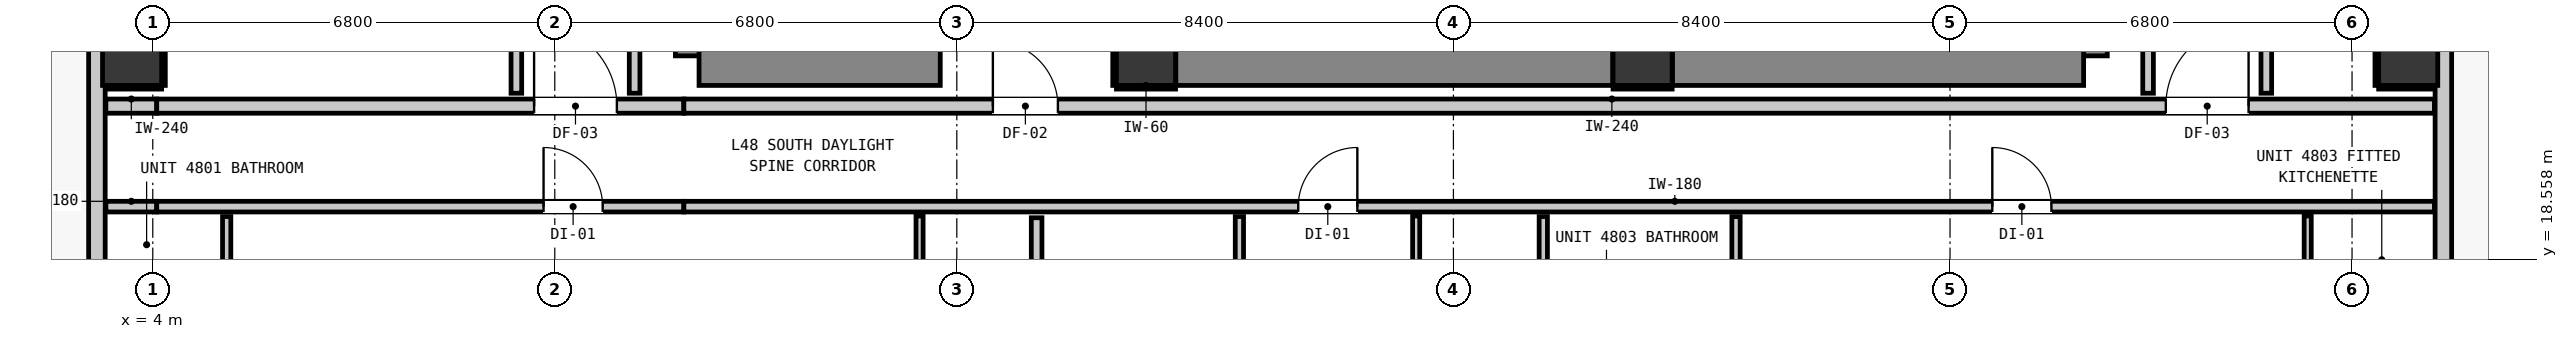
"""IFC4 building model, lengths in metres.
Left out: names, types, materials, properties, quantities, classifications, styles, units other than length and angle.
Written with IfcOpenShell. Run it as: python <this file> out.ifc"""

import sys

from ifc_helpers import new_model, si_unit, direction, frame, frame_2d, origin, origin_2d, place, context, subcontext, project, spatial, rectangle, extrude, element, fill, save


model = new_model("IFC4")
c1 = context("Model", 3, precision=1e-05, world=origin(), true_north=direction((0.0, 1.0)))
c2 = subcontext(c1, "Body", "Model", "MODEL_VIEW")
j1 = project(units=[si_unit("LENGTHUNIT", "METRE"), si_unit("PLANEANGLEUNIT", "RADIAN")], contexts=[c1])
p1 = place(None, origin())
s1 = spatial("IfcSite", under=j1, at=p1, CompositionType="ELEMENT")
p2 = place(p1, origin())
s2 = spatial("IfcBuilding", under=s1, at=p2, CompositionType="ELEMENT")
p3 = place(p2, frame((0.0, 0.0, 165.84)))
s3 = spatial("IfcBuildingStorey", under=s2, at=p3, CompositionType="ELEMENT", Elevation=165.84)
for number, where, z_axis, x_axis in (
    (1, (20.8, 22.0, 0.0), (0.0, 0.0, 1.0), (1.0, 0.0, 0.0)),
    (2, (29.2, 22.0, 0.0), (0.0, 0.0, 1.0), (1.0, 0.0, 0.0)),
):
    element("IfcColumn", number, at=place(p3, frame(where, z_axis=z_axis, x_axis=x_axis)), inside=s3, PredefinedType="COLUMN", context=c2, shape_type="SweptSolid", body=[
        extrude(rectangle(XDim=1.0, YDim=1.0, at=origin_2d()), origin(), (0.0, 0.0, 1.0), 3.32),
    ])
p4 = place(p3, frame((13.34, 22.0, 0.0), z_axis=(0.0, 0.0, 1.0), x_axis=(0.0, 1.0, 0.0)))
e3 = element("IfcWall", 3, at=p4, inside=s3, PredefinedType="SHEAR", context=c2, shape_type="SweptSolid", body=[
    extrude(rectangle(XDim=8.195, YDim=1.0, at=frame_2d((4.098, 0.0))), origin(), (0.0, 0.0, 1.0), 3.32),
])
p5 = place(p3, frame((13.24, 22.0, 0.0), z_axis=(0.0, 0.0, 1.0), x_axis=(1.0, 0.0, 0.0)))
e4 = element("IfcWall", 4, at=p5, inside=s3, PredefinedType="SHEAR", context=c2, shape_type="SweptSolid", body=[
    extrude(rectangle(XDim=4.08, YDim=1.0, at=frame_2d((2.04, 0.0))), origin(), (0.0, 0.0, 1.0), 3.32),
])
p6 = place(p3, frame((36.56, 22.0, 0.0), z_axis=(0.0, 0.0, 1.0), x_axis=(0.0, 1.0, 0.0)))
e5 = element("IfcWall", 5, at=p6, inside=s3, PredefinedType="SHEAR", context=c2, shape_type="SweptSolid", body=[
    extrude(rectangle(XDim=8.195, YDim=1.0, at=frame_2d((4.098, 0.0))), origin(), (0.0, 0.0, 1.0), 3.32),
])
p7 = place(p3, frame((29.705, 22.0, 0.0), z_axis=(0.0, 0.0, 1.0), x_axis=(1.0, 0.0, 0.0)))
e6 = element("IfcWall", 6, at=p7, inside=s3, PredefinedType="SHEAR", context=c2, shape_type="SweptSolid", body=[
    extrude(rectangle(XDim=6.955, YDim=1.0, at=frame_2d((3.478, 0.0))), origin(), (0.0, 0.0, 1.0), 3.32),
])
p8 = place(p3, frame((21.305, 22.0, 0.0), z_axis=(0.0, 0.0, 1.0), x_axis=(1.0, 0.0, 0.0)))
e7 = element("IfcWall", 7, at=p8, inside=s3, PredefinedType="SHEAR", context=c2, shape_type="SweptSolid", body=[
    extrude(rectangle(XDim=7.39, YDim=1.0, at=frame_2d((3.695, 0.0))), origin(), (0.0, 0.0, 1.0), 3.32),
])
for number, where, z_axis, x_axis in (
    (8, (3.65, 22.0, -0.2), (0.0, 0.0, 1.0), (1.0, 0.0, 0.0)),
    (9, (42.15, 22.0, -0.2), (0.0, 0.0, 1.0), (1.0, 0.0, 0.0)),
):
    element("IfcColumn", number, at=place(p3, frame(where, z_axis=z_axis, x_axis=x_axis)), inside=s3, PredefinedType="COLUMN", context=c2, shape_type="SweptSolid", body=[
        extrude(rectangle(XDim=1.0, YDim=1.0, at=origin_2d()), origin(), (0.0, 0.0, 1.0), 3.52),
    ])
p9 = place(p3, frame((3.055, 17.555, 0.0), z_axis=(0.0, 0.0, 1.0), x_axis=(0.0, 1.0, 0.0)))
e10 = element("IfcWall", 10, at=p9, inside=s3, PredefinedType="STANDARD", context=c2, shape_type="SweptSolid", body=[
    extrude(rectangle(XDim=32.29, YDim=0.28, at=frame_2d((16.145, 0.0))), origin(), (0.0, 0.0, 1.0), 3.08),
])
p10 = place(p9, frame((6.871, 0.0, 0.0)))
e11 = element("IfcOpeningElement", 11, at=p10, cuts=e10, PredefinedType="OPENING", context=c2, shape_type="SweptSolid", body=[
    extrude(rectangle(XDim=1.0, YDim=2.15, at=frame_2d((0.5, 1.075))), frame((0.0, 0.15, 0.0), z_axis=(0.0, -1.0, 0.0), x_axis=(1.0, 0.0, 0.0)), (0.0, 0.0, 1.0), 0.3),
])
p11 = place(p9, frame((30.527, 0.0, 0.85)))
e12 = element("IfcOpeningElement", 12, at=p11, cuts=e10, PredefinedType="OPENING", context=c2, shape_type="SweptSolid", body=[
    extrude(rectangle(XDim=1.5, YDim=1.8, at=frame_2d((0.75, 0.9))), frame((0.0, 0.15, 0.0), z_axis=(0.0, -1.0, 0.0), x_axis=(1.0, 0.0, 0.0)), (0.0, 0.0, 1.0), 0.3),
])
p12 = place(p9, frame((8.375, 0.0, 0.85)))
e13 = element("IfcOpeningElement", 13, at=p12, cuts=e10, PredefinedType="OPENING", context=c2, shape_type="SweptSolid", body=[
    extrude(rectangle(XDim=1.5, YDim=1.8, at=frame_2d((0.75, 0.9))), frame((0.0, 0.15, 0.0), z_axis=(0.0, -1.0, 0.0), x_axis=(1.0, 0.0, 0.0)), (0.0, 0.0, 1.0), 0.3),
])
p13 = place(p9, frame((10.762, 0.0, 0.85)))
e14 = element("IfcOpeningElement", 14, at=p13, cuts=e10, PredefinedType="OPENING", context=c2, shape_type="SweptSolid", body=[
    extrude(rectangle(XDim=1.5, YDim=1.8, at=frame_2d((0.75, 0.9))), frame((0.0, 0.15, 0.0), z_axis=(0.0, -1.0, 0.0), x_axis=(1.0, 0.0, 0.0)), (0.0, 0.0, 1.0), 0.3),
])
p14 = place(p9, frame((17.075, 0.0, 0.85)))
e15 = element("IfcOpeningElement", 15, at=p14, cuts=e10, PredefinedType="OPENING", context=c2, shape_type="SweptSolid", body=[
    extrude(rectangle(XDim=1.5, YDim=1.8, at=frame_2d((0.75, 0.9))), frame((0.0, 0.15, 0.0), z_axis=(0.0, -1.0, 0.0), x_axis=(1.0, 0.0, 0.0)), (0.0, 0.0, 1.0), 0.3),
])
p15 = place(p9, frame((20.113, 0.0, 0.85)))
e16 = element("IfcOpeningElement", 16, at=p15, cuts=e10, PredefinedType="OPENING", context=c2, shape_type="SweptSolid", body=[
    extrude(rectangle(XDim=1.05, YDim=1.65, at=frame_2d((0.525, 0.825))), frame((0.0, 0.15, 0.0), z_axis=(0.0, -1.0, 0.0), x_axis=(1.0, 0.0, 0.0)), (0.0, 0.0, 1.0), 0.3),
])
p16 = place(p3, frame((42.745, 49.845, 0.0), z_axis=(0.0, 0.0, 1.0), x_axis=(0.0, -1.0, 0.0)))
e17 = element("IfcWall", 17, at=p16, inside=s3, PredefinedType="STANDARD", context=c2, shape_type="SweptSolid", body=[
    extrude(rectangle(XDim=32.29, YDim=0.28, at=frame_2d((16.145, 0.0))), origin(), (0.0, 0.0, 1.0), 3.08),
])
p17 = place(p16, frame((0.503, 0.0, 0.0)))
e18 = element("IfcOpeningElement", 18, at=p17, cuts=e17, PredefinedType="OPENING", context=c2, shape_type="SweptSolid", body=[
    extrude(rectangle(XDim=1.1, YDim=2.15, at=frame_2d((0.55, 1.075))), frame((0.0, 0.15, 0.0), z_axis=(0.0, -1.0, 0.0), x_axis=(1.0, 0.0, 0.0)), (0.0, 0.0, 1.0), 0.3),
])
p18 = place(p16, frame((2.699, 0.0, 0.85)))
e19 = element("IfcOpeningElement", 19, at=p18, cuts=e17, PredefinedType="OPENING", context=c2, shape_type="SweptSolid", body=[
    extrude(rectangle(XDim=1.5, YDim=1.8, at=frame_2d((0.75, 0.9))), frame((0.0, 0.15, 0.0), z_axis=(0.0, -1.0, 0.0), x_axis=(1.0, 0.0, 0.0)), (0.0, 0.0, 1.0), 0.3),
])
p19 = place(p16, frame((23.17, 0.0, 0.85)))
e20 = element("IfcOpeningElement", 20, at=p19, cuts=e17, PredefinedType="OPENING", context=c2, shape_type="SweptSolid", body=[
    extrude(rectangle(XDim=1.5, YDim=1.8, at=frame_2d((0.75, 0.9))), frame((0.0, 0.15, 0.0), z_axis=(0.0, -1.0, 0.0), x_axis=(1.0, 0.0, 0.0)), (0.0, 0.0, 1.0), 0.3),
])
p20 = place(p16, frame((13.62, 0.0, 0.85)))
e21 = element("IfcOpeningElement", 21, at=p20, cuts=e17, PredefinedType="OPENING", context=c2, shape_type="SweptSolid", body=[
    extrude(rectangle(XDim=1.5, YDim=1.8, at=frame_2d((0.75, 0.9))), frame((0.0, 0.15, 0.0), z_axis=(0.0, -1.0, 0.0), x_axis=(1.0, 0.0, 0.0)), (0.0, 0.0, 1.0), 0.3),
])
p21 = place(p3, frame((3.207, 21.15, 0.0), z_axis=(0.0, 0.0, 1.0), x_axis=(1.0, 0.0, 0.0)))
e22 = element("IfcWall", 22, at=p21, inside=s3, PredefinedType="PARTITIONING", context=c2, shape_type="SweptSolid", body=[
    extrude(rectangle(XDim=0.86, YDim=0.24, at=frame_2d((0.43, 0.0))), origin(), (0.0, 0.0, 1.0), 3.08),
])
p22 = place(p3, frame((4.067, 21.15, 0.0), z_axis=(0.0, 0.0, 1.0), x_axis=(1.0, 0.0, 0.0)))
e23 = element("IfcWall", 23, at=p22, inside=s3, PredefinedType="PARTITIONING", context=c2, shape_type="SweptSolid", body=[
    extrude(rectangle(XDim=8.916, YDim=0.24, at=frame_2d((4.458, 0.0))), origin(), (0.0, 0.0, 1.0), 2.565),
])
p23 = place(p22, frame((6.383, 0.0, 0.0)))
e24 = element("IfcOpeningElement", 24, at=p23, cuts=e23, PredefinedType="OPENING", context=c2, shape_type="SweptSolid", body=[
    extrude(rectangle(XDim=1.4, YDim=2.15, at=frame_2d((0.7, 1.075))), frame((0.0, 0.13, 0.0), z_axis=(0.0, -1.0, 0.0), x_axis=(1.0, 0.0, 0.0)), (0.0, 0.0, 1.0), 0.26),
])
p24 = place(p3, frame((12.983, 21.15, 0.0), z_axis=(0.0, 0.0, 1.0), x_axis=(1.0, 0.0, 0.0)))
e25 = element("IfcWall", 25, at=p24, inside=s3, PredefinedType="PARTITIONING", context=c2, shape_type="SweptSolid", body=[
    extrude(rectangle(XDim=29.61, YDim=0.24, at=frame_2d((14.805, 0.0))), origin(), (0.0, 0.0, 1.0), 3.08),
])
p25 = place(p24, frame((5.227, 0.0, 0.0)))
e26 = element("IfcOpeningElement", 26, at=p25, cuts=e25, PredefinedType="OPENING", context=c2, shape_type="SweptSolid", body=[
    extrude(rectangle(XDim=1.1, YDim=2.15, at=frame_2d((0.55, 1.075))), frame((0.0, 0.13, 0.0), z_axis=(0.0, -1.0, 0.0), x_axis=(1.0, 0.0, 0.0)), (0.0, 0.0, 1.0), 0.26),
])
p26 = place(p24, frame((25.067, 0.0, 0.0)))
e27 = element("IfcOpeningElement", 27, at=p26, cuts=e25, PredefinedType="OPENING", context=c2, shape_type="SweptSolid", body=[
    extrude(rectangle(XDim=1.4, YDim=2.15, at=frame_2d((0.7, 1.075))), frame((0.0, 0.13, 0.0), z_axis=(0.0, -1.0, 0.0), x_axis=(1.0, 0.0, 0.0)), (0.0, 0.0, 1.0), 0.26),
])
p27 = place(p3, frame((3.207, 19.45, 0.0), z_axis=(0.0, 0.0, 1.0), x_axis=(1.0, 0.0, 0.0)))
e28 = element("IfcWall", 28, at=p27, inside=s3, PredefinedType="PARTITIONING", context=c2, shape_type="SweptSolid", body=[
    extrude(rectangle(XDim=0.86, YDim=0.18, at=frame_2d((0.43, 0.0))), origin(), (0.0, 0.0, 1.0), 3.08),
])
p28 = place(p3, frame((4.067, 19.45, 0.0), z_axis=(0.0, 0.0, 1.0), x_axis=(1.0, 0.0, 0.0)))
e29 = element("IfcWall", 29, at=p28, inside=s3, PredefinedType="PARTITIONING", context=c2, shape_type="SweptSolid", body=[
    extrude(rectangle(XDim=8.916, YDim=0.18, at=frame_2d((4.458, 0.0))), origin(), (0.0, 0.0, 1.0), 2.565),
])
p29 = place(p28, frame((6.543, 0.0, 0.0)))
e30 = element("IfcOpeningElement", 30, at=p29, cuts=e29, PredefinedType="OPENING", context=c2, shape_type="SweptSolid", body=[
    extrude(rectangle(XDim=1.0, YDim=2.15, at=frame_2d((0.5, 1.075))), frame((0.0, 0.1, 0.0), z_axis=(0.0, -1.0, 0.0), x_axis=(1.0, 0.0, 0.0)), (0.0, 0.0, 1.0), 0.2),
])
p30 = place(p3, frame((12.983, 19.45, 0.0), z_axis=(0.0, 0.0, 1.0), x_axis=(1.0, 0.0, 0.0)))
e31 = element("IfcWall", 31, at=p30, inside=s3, PredefinedType="PARTITIONING", context=c2, shape_type="SweptSolid", body=[
    extrude(rectangle(XDim=29.61, YDim=0.18, at=frame_2d((14.805, 0.0))), origin(), (0.0, 0.0, 1.0), 3.08),
])
p31 = place(p30, frame((10.392, 0.0, 0.0)))
e32 = element("IfcOpeningElement", 32, at=p31, cuts=e31, PredefinedType="OPENING", context=c2, shape_type="SweptSolid", body=[
    extrude(rectangle(XDim=1.0, YDim=2.15, at=frame_2d((0.5, 1.075))), frame((0.0, 0.1, 0.0), z_axis=(0.0, -1.0, 0.0), x_axis=(1.0, 0.0, 0.0)), (0.0, 0.0, 1.0), 0.2),
])
p32 = place(p30, frame((22.132, 0.0, 0.0)))
e33 = element("IfcOpeningElement", 33, at=p32, cuts=e31, PredefinedType="OPENING", context=c2, shape_type="SweptSolid", body=[
    extrude(rectangle(XDim=1.0, YDim=2.15, at=frame_2d((0.5, 1.075))), frame((0.0, 0.1, 0.0), z_axis=(0.0, -1.0, 0.0), x_axis=(1.0, 0.0, 0.0)), (0.0, 0.0, 1.0), 0.2),
])
p33 = place(p3, frame((10.15, 21.368, 0.0), z_axis=(0.0, 0.0, 1.0), x_axis=(0.0, 1.0, 0.0)))
e34 = element("IfcWall", 34, at=p33, inside=s3, PredefinedType="PARTITIONING", context=c2, shape_type="SweptSolid", body=[
    extrude(rectangle(XDim=2.298, YDim=0.18, at=frame_2d((1.149, 0.0))), origin(), (0.0, 0.0, 1.0), 3.08),
])
p34 = place(p3, frame((12.15, 21.368, 0.0), z_axis=(0.0, 0.0, 1.0), x_axis=(0.0, 1.0, 0.0)))
e35 = element("IfcWall", 35, at=p34, inside=s3, PredefinedType="PARTITIONING", context=c2, shape_type="SweptSolid", body=[
    extrude(rectangle(XDim=18.694, YDim=0.18, at=frame_2d((9.347, 0.0))), origin(), (0.0, 0.0, 1.0), 3.08),
])
p35 = place(p3, frame((18.95, 15.407, 0.0), z_axis=(0.0, 0.0, 1.0), x_axis=(0.0, 1.0, 0.0)))
e36 = element("IfcWall", 36, at=p35, inside=s3, PredefinedType="PARTITIONING", context=c2, shape_type="SweptSolid", body=[
    extrude(rectangle(XDim=3.855, YDim=0.18, at=frame_2d((1.927, 0.0))), origin(), (0.0, 0.0, 1.0), 3.08),
])
p36 = place(p3, frame((37.75, 21.368, 0.0), z_axis=(0.0, 0.0, 1.0), x_axis=(0.0, 1.0, 0.0)))
e37 = element("IfcWall", 37, at=p36, inside=s3, PredefinedType="PARTITIONING", context=c2, shape_type="SweptSolid", body=[
    extrude(rectangle(XDim=18.694, YDim=0.18, at=frame_2d((9.347, 0.0))), origin(), (0.0, 0.0, 1.0), 3.08),
])
p37 = place(p3, frame((39.75, 21.368, 0.0), z_axis=(0.0, 0.0, 1.0), x_axis=(0.0, 1.0, 0.0)))
e38 = element("IfcWall", 38, at=p37, inside=s3, PredefinedType="PARTITIONING", context=c2, shape_type="SweptSolid", body=[
    extrude(rectangle(XDim=2.576, YDim=0.18, at=frame_2d((1.288, 0.0))), origin(), (0.0, 0.0, 1.0), 3.08),
])
p38 = place(p3, frame((5.25, 15.575, 0.0), z_axis=(0.0, 0.0, 1.0), x_axis=(0.0, 1.0, 0.0)))
e39 = element("IfcWall", 39, at=p38, inside=s3, PredefinedType="PARTITIONING", context=c2, shape_type="SweptSolid", body=[
    extrude(rectangle(XDim=3.707, YDim=0.14, at=frame_2d((1.854, 0.0))), origin(), (0.0, 0.0, 1.0), 3.08),
])
p39 = place(p38, frame((1.42, 0.0, 0.0)))
e40 = element("IfcOpeningElement", 40, at=p39, cuts=e39, PredefinedType="OPENING", context=c2, shape_type="SweptSolid", body=[
    extrude(rectangle(XDim=0.86, YDim=2.02, at=frame_2d((0.43, 1.01))), frame((0.0, 0.08, 0.0), z_axis=(0.0, -1.0, 0.0), x_axis=(1.0, 0.0, 0.0)), (0.0, 0.0, 1.0), 0.16),
])
p40 = place(p3, frame((22.38, 15.407, 0.0), z_axis=(0.0, 0.0, 1.0), x_axis=(0.0, 1.0, 0.0)))
e41 = element("IfcWall", 41, at=p40, inside=s3, PredefinedType="PARTITIONING", context=c2, shape_type="SweptSolid", body=[
    extrude(rectangle(XDim=3.875, YDim=0.14, at=frame_2d((1.938, 0.0))), origin(), (0.0, 0.0, 1.0), 3.08),
])
p41 = place(p40, frame((1.588, 0.0, 0.0)))
e42 = element("IfcOpeningElement", 42, at=p41, cuts=e41, PredefinedType="OPENING", context=c2, shape_type="SweptSolid", body=[
    extrude(rectangle(XDim=0.86, YDim=2.02, at=frame_2d((0.43, 1.01))), frame((0.0, 0.08, 0.0), z_axis=(0.0, -1.0, 0.0), x_axis=(1.0, 0.0, 0.0)), (0.0, 0.0, 1.0), 0.16),
])
p42 = place(p3, frame((27.52, 15.407, 0.0), z_axis=(0.0, 0.0, 1.0), x_axis=(0.0, 1.0, 0.0)))
e43 = element("IfcWall", 43, at=p42, inside=s3, PredefinedType="PARTITIONING", context=c2, shape_type="SweptSolid", body=[
    extrude(rectangle(XDim=3.875, YDim=0.14, at=frame_2d((1.938, 0.0))), origin(), (0.0, 0.0, 1.0), 3.08),
])
p43 = place(p3, frame((30.78, 15.407, 0.0), z_axis=(0.0, 0.0, 1.0), x_axis=(0.0, 1.0, 0.0)))
e44 = element("IfcWall", 44, at=p43, inside=s3, PredefinedType="PARTITIONING", context=c2, shape_type="SweptSolid", body=[
    extrude(rectangle(XDim=3.875, YDim=0.14, at=frame_2d((1.938, 0.0))), origin(), (0.0, 0.0, 1.0), 3.08),
])
p44 = place(p43, frame((1.588, 0.0, 0.0)))
e45 = element("IfcOpeningElement", 45, at=p44, cuts=e44, PredefinedType="OPENING", context=c2, shape_type="SweptSolid", body=[
    extrude(rectangle(XDim=0.86, YDim=2.02, at=frame_2d((0.43, 1.01))), frame((0.0, 0.08, 0.0), z_axis=(0.0, -1.0, 0.0), x_axis=(1.0, 0.0, 0.0)), (0.0, 0.0, 1.0), 0.16),
])
p45 = place(p3, frame((16.97, 15.407, 0.0), z_axis=(0.0, 0.0, 1.0), x_axis=(0.0, 1.0, 0.0)))
e46 = element("IfcWall", 46, at=p45, inside=s3, PredefinedType="PARTITIONING", context=c2, shape_type="SweptSolid", body=[
    extrude(rectangle(XDim=3.885, YDim=0.12, at=frame_2d((1.942, 0.0))), origin(), (0.0, 0.0, 1.0), 3.08),
])
p46 = place(p45, frame((1.568, 0.0, 0.0)))
e47 = element("IfcOpeningElement", 47, at=p46, cuts=e46, PredefinedType="OPENING", context=c2, shape_type="SweptSolid", body=[
    extrude(rectangle(XDim=0.9, YDim=2.1, at=frame_2d((0.45, 1.05))), frame((0.0, 0.07, 0.0), z_axis=(0.0, -1.0, 0.0), x_axis=(1.0, 0.0, 0.0)), (0.0, 0.0, 1.0), 0.14),
])
p47 = place(p3, frame((25.37, 15.407, 0.0), z_axis=(0.0, 0.0, 1.0), x_axis=(0.0, 1.0, 0.0)))
e48 = element("IfcWall", 48, at=p47, inside=s3, PredefinedType="PARTITIONING", context=c2, shape_type="SweptSolid", body=[
    extrude(rectangle(XDim=3.885, YDim=0.12, at=frame_2d((1.942, 0.0))), origin(), (0.0, 0.0, 1.0), 3.08),
])
p48 = place(p47, frame((1.568, 0.0, 0.0)))
e49 = element("IfcOpeningElement", 49, at=p48, cuts=e48, PredefinedType="OPENING", context=c2, shape_type="SweptSolid", body=[
    extrude(rectangle(XDim=0.9, YDim=2.1, at=frame_2d((0.45, 1.05))), frame((0.0, 0.07, 0.0), z_axis=(0.0, -1.0, 0.0), x_axis=(1.0, 0.0, 0.0)), (0.0, 0.0, 1.0), 0.14),
])
p49 = place(p3, frame((40.45, 15.475, 0.0), z_axis=(0.0, 0.0, 1.0), x_axis=(0.0, 1.0, 0.0)))
e50 = element("IfcWall", 50, at=p49, inside=s3, PredefinedType="PARTITIONING", context=c2, shape_type="SweptSolid", body=[
    extrude(rectangle(XDim=3.817, YDim=0.12, at=frame_2d((1.908, 0.0))), origin(), (0.0, 0.0, 1.0), 3.08),
])
p50 = place(p49, frame((1.5, 0.0, 0.0)))
e51 = element("IfcOpeningElement", 51, at=p50, cuts=e50, PredefinedType="OPENING", context=c2, shape_type="SweptSolid", body=[
    extrude(rectangle(XDim=0.9, YDim=2.1, at=frame_2d((0.45, 1.05))), frame((0.0, 0.07, 0.0), z_axis=(0.0, -1.0, 0.0), x_axis=(1.0, 0.0, 0.0)), (0.0, 0.0, 1.0), 0.14),
])
for number, where, z_axis, x_axis in (
    (52, (20.3, 21.468, 0.0), (0.0, 0.0, 1.0), (1.0, 0.0, 0.0)),
    (53, (20.268, 21.5, 0.0), (0.0, 0.0, 1.0), (0.0, 1.0, 0.0)),
    (54, (28.7, 21.468, 0.0), (0.0, 0.0, 1.0), (1.0, 0.0, 0.0)),
):
    element("IfcWall", number, at=place(p3, frame(where, z_axis=z_axis, x_axis=x_axis)), inside=s3, PredefinedType="PARTITIONING", context=c2, shape_type="SweptSolid", body=[
        extrude(rectangle(XDim=1.0, YDim=0.06, at=frame_2d((0.5, 0.0))), origin(), (0.0, 0.0, 1.0), 1.45),
    ])
p51 = place(p3, frame((3.21, 21.468, 0.0), z_axis=(0.0, 0.0, 1.0), x_axis=(1.0, 0.0, 0.0)))
e55 = element("IfcWall", 55, at=p51, inside=s3, PredefinedType="PARTITIONING", context=c2, shape_type="SweptSolid", body=[
    extrude(rectangle(XDim=0.94, YDim=0.06, at=frame_2d((0.47, 0.0))), origin(), (0.0, 0.0, 1.0), 1.45),
])
p52 = place(p3, frame((4.182, 21.5, 0.0), z_axis=(0.0, 0.0, 1.0), x_axis=(0.0, 1.0, 0.0)))
e56 = element("IfcWall", 56, at=p52, inside=s3, PredefinedType="PARTITIONING", context=c2, shape_type="SweptSolid", body=[
    extrude(rectangle(XDim=1.0, YDim=0.06, at=frame_2d((0.5, 0.0))), origin(), (0.0, 0.0, 1.0), 1.45),
])
p53 = place(p3, frame((41.65, 21.468, 0.0), z_axis=(0.0, 0.0, 1.0), x_axis=(1.0, 0.0, 0.0)))
e57 = element("IfcWall", 57, at=p53, inside=s3, PredefinedType="PARTITIONING", context=c2, shape_type="SweptSolid", body=[
    extrude(rectangle(XDim=0.94, YDim=0.06, at=frame_2d((0.47, 0.0))), origin(), (0.0, 0.0, 1.0), 1.45),
])
p54 = place(p3, frame((41.618, 21.5, 0.0), z_axis=(0.0, 0.0, 1.0), x_axis=(0.0, 1.0, 0.0)))
e58 = element("IfcWall", 58, at=p54, inside=s3, PredefinedType="PARTITIONING", context=c2, shape_type="SweptSolid", body=[
    extrude(rectangle(XDim=1.0, YDim=0.06, at=frame_2d((0.5, 0.0))), origin(), (0.0, 0.0, 1.0), 1.45),
])
p55 = place(p25, origin())
e59 = element("IfcDoor", 59, at=p55, inside=s3, OperationType="SINGLE_SWING_LEFT", PredefinedType="DOOR", context=c2, shape_type="SweptSolid", body=[
    extrude(rectangle(XDim=1.1, YDim=2.15, at=frame_2d((0.55, 1.075))), frame((0.0, 0.025, 0.0), z_axis=(0.0, -1.0, 0.0), x_axis=(1.0, 0.0, 0.0)), (0.0, 0.0, 1.0), 0.05),
])
fill(e26, e59)
p56 = place(p23, origin())
e60 = element("IfcDoor", 60, at=p56, inside=s3, OperationType="SINGLE_SWING_LEFT", PredefinedType="DOOR", context=c2, shape_type="SweptSolid", body=[
    extrude(rectangle(XDim=1.4, YDim=2.15, at=frame_2d((0.7, 1.075))), frame((0.0, 0.025, 0.0), z_axis=(0.0, -1.0, 0.0), x_axis=(1.0, 0.0, 0.0)), (0.0, 0.0, 1.0), 0.05),
])
fill(e24, e60)
p57 = place(p26, origin())
e61 = element("IfcDoor", 61, at=p57, inside=s3, OperationType="SINGLE_SWING_RIGHT", PredefinedType="DOOR", context=c2, shape_type="SweptSolid", body=[
    extrude(rectangle(XDim=1.4, YDim=2.15, at=frame_2d((0.7, 1.075))), frame((0.0, 0.025, 0.0), z_axis=(0.0, -1.0, 0.0), x_axis=(1.0, 0.0, 0.0)), (0.0, 0.0, 1.0), 0.05),
])
fill(e27, e61)
p58 = place(p29, origin())
e62 = element("IfcDoor", 62, at=p58, inside=s3, OperationType="SINGLE_SWING_LEFT", PredefinedType="DOOR", context=c2, shape_type="SweptSolid", body=[
    extrude(rectangle(XDim=1.0, YDim=2.15, at=frame_2d((0.5, 1.075))), frame((0.0, 0.025, 0.0), z_axis=(0.0, -1.0, 0.0), x_axis=(1.0, 0.0, 0.0)), (0.0, 0.0, 1.0), 0.05),
])
fill(e30, e62)
p59 = place(p31, origin())
e63 = element("IfcDoor", 63, at=p59, inside=s3, OperationType="SINGLE_SWING_RIGHT", PredefinedType="DOOR", context=c2, shape_type="SweptSolid", body=[
    extrude(rectangle(XDim=1.0, YDim=2.15, at=frame_2d((0.5, 1.075))), frame((0.0, 0.025, 0.0), z_axis=(0.0, -1.0, 0.0), x_axis=(1.0, 0.0, 0.0)), (0.0, 0.0, 1.0), 0.05),
])
fill(e32, e63)
p60 = place(p32, origin())
e64 = element("IfcDoor", 64, at=p60, inside=s3, OperationType="SINGLE_SWING_LEFT", PredefinedType="DOOR", context=c2, shape_type="SweptSolid", body=[
    extrude(rectangle(XDim=1.0, YDim=2.15, at=frame_2d((0.5, 1.075))), frame((0.0, 0.025, 0.0), z_axis=(0.0, -1.0, 0.0), x_axis=(1.0, 0.0, 0.0)), (0.0, 0.0, 1.0), 0.05),
])
fill(e33, e64)
save(model, sys.argv[1])
